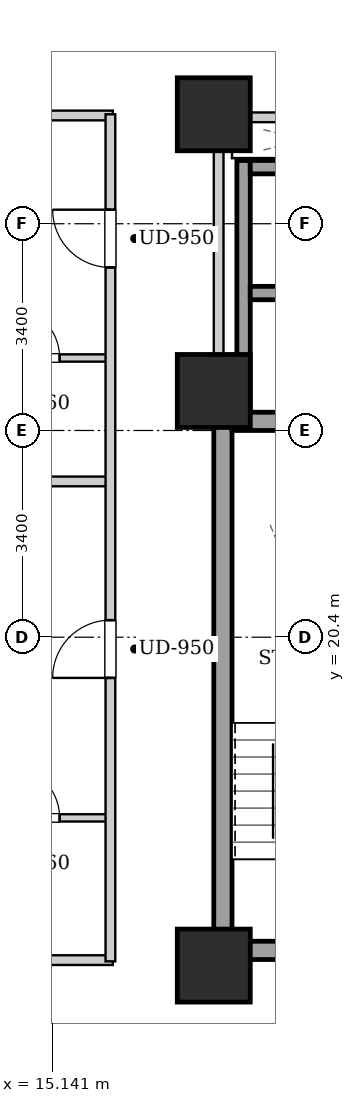
"""IFC4 building model, lengths in metres.
Left out: names, types, materials, properties, quantities, classifications, styles, units other than length and angle.
Written with IfcOpenShell. Run it as: python <this file> out.ifc"""

import sys

from ifc_helpers import new_model, si_unit, direction, frame, frame_2d, origin, origin_2d, place, context, subcontext, project, spatial, rectangle, extrude, element, fill, save


model = new_model("IFC4")
c1 = context("Model", 3, precision=1e-05, world=origin(), true_north=direction((0.0, 1.0)))
c2 = subcontext(c1, "Body", "Model", "MODEL_VIEW")
j1 = project(units=[si_unit("LENGTHUNIT", "METRE"), si_unit("PLANEANGLEUNIT", "RADIAN")], contexts=[c1])
p1 = place(None, origin())
s1 = spatial("IfcSite", under=j1, at=p1, CompositionType="ELEMENT")
p2 = place(p1, origin())
s2 = spatial("IfcBuilding", under=s1, at=p2, CompositionType="ELEMENT")
p3 = place(p2, frame((0.0, 0.0, 64.2)))
s3 = spatial("IfcBuildingStorey", under=s2, at=p3, CompositionType="ELEMENT", Elevation=64.2)
for number, where, z_axis, x_axis in (
    (1, (17.8, 15.0, 0.0), (0.0, 0.0, 1.0), (1.0, 0.0, 0.0)),
    (2, (17.8, 29.0, 0.0), (0.0, 0.0, 1.0), (1.0, 0.0, 0.0)),
    (3, (17.8, 24.45, 0.0), (0.0, 0.0, 1.0), (1.0, 0.0, 0.0)),
):
    element("IfcColumn", number, at=place(p3, frame(where, z_axis=z_axis, x_axis=x_axis)), inside=s3, PredefinedType="COLUMN", context=c2, shape_type="SweptSolid", body=[
        extrude(rectangle(XDim=1.2, YDim=1.2, at=origin_2d()), origin(), (0.0, 0.0, 1.0), 3.2),
    ])
p4 = place(p3, frame((17.95, 15.1, 0.0), z_axis=(0.0, 0.0, 1.0), x_axis=(0.0, 1.0, 0.0)))
e4 = element("IfcWall", 4, at=p4, inside=s3, PredefinedType="SHEAR", context=c2, shape_type="SweptSolid", body=[
    extrude(rectangle(XDim=9.0, YDim=0.3, at=frame_2d((4.5, 0.0))), origin(), (0.0, 0.0, 1.0), 2.94),
])
p5 = place(p3, frame((18.1, 23.95, 0.0), z_axis=(0.0, 0.0, 1.0), x_axis=(1.0, 0.0, 0.0)))
e5 = element("IfcWall", 5, at=p5, inside=s3, PredefinedType="SHEAR", context=c2, shape_type="SweptSolid", body=[
    extrude(rectangle(XDim=2.85, YDim=0.3, at=frame_2d((1.425, 0.0))), origin(), (0.0, 0.0, 1.0), 2.94),
])
p6 = place(p3, frame((18.1, 15.25, 0.0), z_axis=(0.0, 0.0, 1.0), x_axis=(1.0, 0.0, 0.0)))
e6 = element("IfcWall", 6, at=p6, inside=s3, PredefinedType="SHEAR", context=c2, shape_type="SweptSolid", body=[
    extrude(rectangle(XDim=2.85, YDim=0.3, at=frame_2d((1.425, 0.0))), origin(), (0.0, 0.0, 1.0), 2.94),
])
p7 = place(p6, frame((0.86, 0.0, 0.0)))
e7 = element("IfcOpeningElement", 7, at=p7, cuts=e6, PredefinedType="OPENING", context=c2, shape_type="SweptSolid", body=[
    extrude(rectangle(XDim=1.1, YDim=2.05, at=frame_2d((0.55, 1.025))), frame((0.0, 0.16, 0.0), z_axis=(0.0, -1.0, 0.0), x_axis=(1.0, 0.0, 0.0)), (0.0, 0.0, 1.0), 0.32),
])
p8 = place(p3, frame((18.29, 24.1, 0.0), z_axis=(0.0, 0.0, 1.0), x_axis=(0.0, 1.0, 0.0)))
e8 = element("IfcWall", 8, at=p8, inside=s3, PredefinedType="SHEAR", context=c2, shape_type="SweptSolid", body=[
    extrude(rectangle(XDim=4.14, YDim=0.22, at=frame_2d((2.07, 0.0))), origin(), (0.0, 0.0, 1.0), 2.94),
])
for number, where, z_axis, x_axis in (
    (9, (18.4, 26.06, 0.0), (0.0, 0.0, 1.0), (1.0, 0.0, 0.0)),
    (10, (18.4, 28.13, 0.0), (0.0, 0.0, 1.0), (1.0, 0.0, 0.0)),
):
    element("IfcWall", number, at=place(p3, frame(where, z_axis=z_axis, x_axis=x_axis)), inside=s3, PredefinedType="SHEAR", context=c2, shape_type="SweptSolid", body=[
        extrude(rectangle(XDim=1.9, YDim=0.22, at=frame_2d((0.95, 0.0))), origin(), (0.0, 0.0, 1.0), 2.94),
    ])
p9 = place(p3, frame((17.88, 24.12, 0.0), z_axis=(0.0, 0.0, 1.0), x_axis=(0.0, 1.0, 0.0)))
e11 = element("IfcWall", 11, at=p9, inside=s3, PredefinedType="PARTITIONING", context=c2, shape_type="SweptSolid", body=[
    extrude(rectangle(XDim=4.76, YDim=0.16, at=frame_2d((2.38, 0.0))), origin(), (0.0, 0.0, 1.0), 2.94),
])
p10 = place(p3, frame((17.96, 28.95, 0.0), z_axis=(0.0, 0.0, 1.0), x_axis=(1.0, 0.0, 0.0)))
e12 = element("IfcWall", 12, at=p10, inside=s3, PredefinedType="PARTITIONING", context=c2, shape_type="SweptSolid", body=[
    extrude(rectangle(XDim=4.29, YDim=0.16, at=frame_2d((2.145, 0.0))), origin(), (0.0, 0.0, 1.0), 2.232),
])
p11 = place(p10, frame((1.57, 0.0, 0.0)))
e13 = element("IfcOpeningElement", 13, at=p11, cuts=e12, PredefinedType="OPENING", context=c2, shape_type="SweptSolid", body=[
    extrude(rectangle(XDim=0.86, YDim=2.05, at=frame_2d((0.43, 1.025))), frame((0.0, 0.09, 0.0), z_axis=(0.0, -1.0, 0.0), x_axis=(1.0, 0.0, 0.0)), (0.0, 0.0, 1.0), 0.18),
])
for number, where, z_axis, x_axis in (
    (14, (7.78, 15.09, 0.0), (0.0, 0.0, 1.0), (1.0, 0.0, 0.0)),
    (15, (7.78, 28.98, 0.0), (0.0, 0.0, 1.0), (1.0, 0.0, 0.0)),
):
    element("IfcWall", number, at=place(p3, frame(where, z_axis=z_axis, x_axis=x_axis)), inside=s3, PredefinedType="PARTITIONING", context=c2, shape_type="SweptSolid", body=[
        extrude(rectangle(XDim=8.36, YDim=0.16, at=frame_2d((4.18, 0.0))), origin(), (0.0, 0.0, 1.0), 2.232),
    ])
p12 = place(p3, frame((7.78, 22.962, 0.0), z_axis=(0.0, 0.0, 1.0), x_axis=(1.0, 0.0, 0.0)))
e16 = element("IfcWall", 16, at=p12, inside=s3, PredefinedType="PARTITIONING", context=c2, shape_type="SweptSolid", body=[
    extrude(rectangle(XDim=8.28, YDim=0.16, at=frame_2d((4.14, 0.0))), origin(), (0.0, 0.0, 1.0), 2.94),
])
p13 = place(p3, frame((13.61, 17.429, 0.0), z_axis=(0.0, 0.0, 1.0), x_axis=(1.0, 0.0, 0.0)))
e17 = element("IfcWall", 17, at=p13, inside=s3, PredefinedType="PARTITIONING", context=c2, shape_type="SweptSolid", body=[
    extrude(rectangle(XDim=2.45, YDim=0.12, at=frame_2d((1.225, 0.0))), origin(), (0.0, 0.0, 1.0), 2.94),
])
p14 = place(p13, frame((0.795, 0.0, 0.0)))
e18 = element("IfcOpeningElement", 18, at=p14, cuts=e17, PredefinedType="OPENING", context=c2, shape_type="SweptSolid", body=[
    extrude(rectangle(XDim=0.86, YDim=2.05, at=frame_2d((0.43, 1.025))), frame((0.0, 0.07, 0.0), z_axis=(0.0, -1.0, 0.0), x_axis=(1.0, 0.0, 0.0)), (0.0, 0.0, 1.0), 0.14),
])
p15 = place(p3, frame((13.61, 24.992, 0.0), z_axis=(0.0, 0.0, 1.0), x_axis=(1.0, 0.0, 0.0)))
e19 = element("IfcWall", 19, at=p15, inside=s3, PredefinedType="PARTITIONING", context=c2, shape_type="SweptSolid", body=[
    extrude(rectangle(XDim=2.45, YDim=0.12, at=frame_2d((1.225, 0.0))), origin(), (0.0, 0.0, 1.0), 2.94),
])
p16 = place(p15, frame((0.795, 0.0, 0.0)))
e20 = element("IfcOpeningElement", 20, at=p16, cuts=e19, PredefinedType="OPENING", context=c2, shape_type="SweptSolid", body=[
    extrude(rectangle(XDim=0.86, YDim=2.05, at=frame_2d((0.43, 1.025))), frame((0.0, 0.07, 0.0), z_axis=(0.0, -1.0, 0.0), x_axis=(1.0, 0.0, 0.0)), (0.0, 0.0, 1.0), 0.14),
])
p17 = place(p3, frame((16.1, 15.07, 0.0), z_axis=(0.0, 0.0, 1.0), x_axis=(0.0, 1.0, 0.0)))
e21 = element("IfcWall", 21, at=p17, inside=s3, PredefinedType="PARTITIONING", context=c2, shape_type="SweptSolid", body=[
    extrude(rectangle(XDim=13.93, YDim=0.16, at=frame_2d((6.965, 0.0))), origin(), (0.0, 0.0, 1.0), 2.94),
])
p18 = place(p17, frame((4.661, 0.0, 0.0)))
e22 = element("IfcOpeningElement", 22, at=p18, cuts=e21, PredefinedType="OPENING", context=c2, shape_type="SweptSolid", body=[
    extrude(rectangle(XDim=0.95, YDim=2.1, at=frame_2d((0.475, 1.05))), frame((0.0, 0.09, 0.0), z_axis=(0.0, -1.0, 0.0), x_axis=(1.0, 0.0, 0.0)), (0.0, 0.0, 1.0), 0.18),
])
p19 = place(p17, frame((11.411, 0.0, 0.0)))
e23 = element("IfcOpeningElement", 23, at=p19, cuts=e21, PredefinedType="OPENING", context=c2, shape_type="SweptSolid", body=[
    extrude(rectangle(XDim=0.95, YDim=2.1, at=frame_2d((0.475, 1.05))), frame((0.0, 0.09, 0.0), z_axis=(0.0, -1.0, 0.0), x_axis=(1.0, 0.0, 0.0)), (0.0, 0.0, 1.0), 0.18),
])
p20 = place(p14, origin())
e24 = element("IfcDoor", 24, at=p20, inside=s3, OperationType="SINGLE_SWING_LEFT", PredefinedType="DOOR", context=c2, shape_type="SweptSolid", body=[
    extrude(rectangle(XDim=0.86, YDim=2.05, at=frame_2d((0.43, 1.025))), frame((0.0, 0.025, 0.0), z_axis=(0.0, -1.0, 0.0), x_axis=(1.0, 0.0, 0.0)), (0.0, 0.0, 1.0), 0.05),
])
fill(e18, e24)
p21 = place(p16, origin())
e25 = element("IfcDoor", 25, at=p21, inside=s3, OperationType="SINGLE_SWING_LEFT", PredefinedType="DOOR", context=c2, shape_type="SweptSolid", body=[
    extrude(rectangle(XDim=0.86, YDim=2.05, at=frame_2d((0.43, 1.025))), frame((0.0, 0.025, 0.0), z_axis=(0.0, -1.0, 0.0), x_axis=(1.0, 0.0, 0.0)), (0.0, 0.0, 1.0), 0.05),
])
fill(e20, e25)
p22 = place(p18, origin())
e26 = element("IfcDoor", 26, at=p22, inside=s3, OperationType="SINGLE_SWING_LEFT", PredefinedType="DOOR", context=c2, shape_type="SweptSolid", body=[
    extrude(rectangle(XDim=0.95, YDim=2.1, at=frame_2d((0.475, 1.05))), frame((0.0, 0.025, 0.0), z_axis=(0.0, -1.0, 0.0), x_axis=(1.0, 0.0, 0.0)), (0.0, 0.0, 1.0), 0.05),
])
fill(e22, e26)
p23 = place(p19, origin())
e27 = element("IfcDoor", 27, at=p23, inside=s3, OperationType="SINGLE_SWING_RIGHT", PredefinedType="DOOR", context=c2, shape_type="SweptSolid", body=[
    extrude(rectangle(XDim=0.95, YDim=2.1, at=frame_2d((0.475, 1.05))), frame((0.0, 0.025, 0.0), z_axis=(0.0, -1.0, 0.0), x_axis=(1.0, 0.0, 0.0)), (0.0, 0.0, 1.0), 0.05),
])
fill(e23, e27)
save(model, sys.argv[1])
